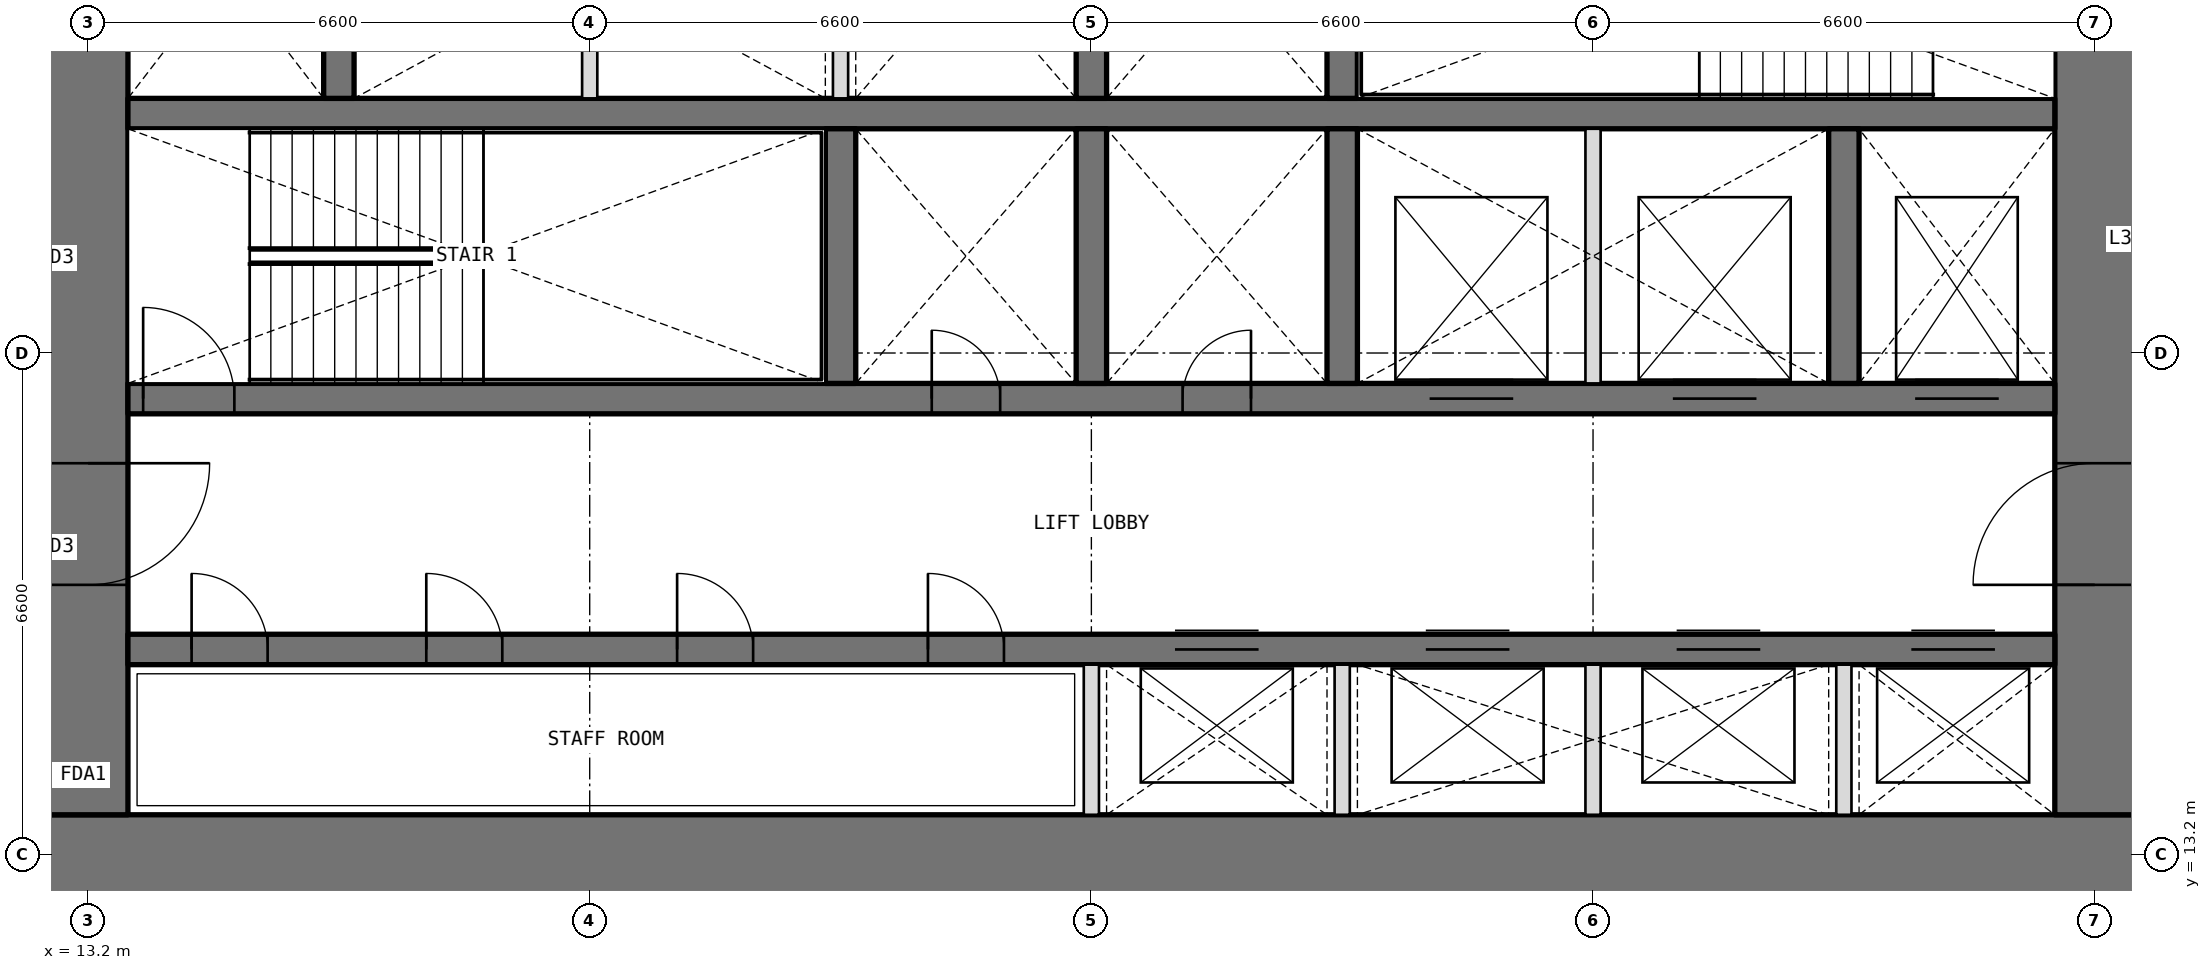
"""IFC4 building model, lengths in metres.
Left out: names, types, materials, properties, quantities, classifications, styles, units other than length and angle.
Written with IfcOpenShell. Run it as: python <this file> out.ifc"""

import sys

from ifc_helpers import new_model, si_unit, direction, frame, frame_2d, origin, place, context, subcontext, project, spatial, rectangle, extrude, element, fill, save


model = new_model("IFC4")
c1 = context("Model", 3, precision=1e-05, world=origin(), true_north=direction((0.0, 1.0)))
c2 = subcontext(c1, "Body", "Model", "MODEL_VIEW")
j1 = project(units=[si_unit("LENGTHUNIT", "METRE"), si_unit("PLANEANGLEUNIT", "RADIAN")], contexts=[c1])
p1 = place(None, origin())
s1 = spatial("IfcSite", under=j1, at=p1, CompositionType="ELEMENT")
p2 = place(p1, origin())
s2 = spatial("IfcBuilding", under=s1, at=p2, CompositionType="ELEMENT")
p3 = place(p2, frame((0.0, 0.0, 132.6)))
s3 = spatial("IfcBuildingStorey", under=s2, at=p3, CompositionType="ELEMENT", Elevation=132.6)
p4 = place(p3, frame((12.675, 13.2, 0.0), z_axis=(0.0, 0.0, 1.0), x_axis=(1.0, 0.0, 0.0)))
e1 = element("IfcWall", 1, at=p4, inside=s3, PredefinedType="SHEAR", context=c2, shape_type="SweptSolid", body=[
    extrude(rectangle(XDim=27.45, YDim=1.05, at=frame_2d((13.725, 0.0))), origin(), (0.0, 0.0, 1.0), 4.2),
])
p5 = place(p3, frame((39.6, 13.725, 0.0), z_axis=(0.0, 0.0, 1.0), x_axis=(0.0, 1.0, 0.0)))
e2 = element("IfcWall", 2, at=p5, inside=s3, PredefinedType="SHEAR", context=c2, shape_type="SweptSolid", body=[
    extrude(rectangle(XDim=18.75, YDim=1.05, at=frame_2d((9.375, 0.0))), origin(), (0.0, 0.0, 1.0), 4.2),
])
p6 = place(p5, frame((3.025, 0.0, 0.0)))
e3 = element("IfcOpeningElement", 3, at=p6, cuts=e2, PredefinedType="OPENING", context=c2, shape_type="SweptSolid", body=[
    extrude(rectangle(XDim=1.6, YDim=2.1, at=frame_2d((0.8, 1.05))), frame((0.0, 0.535, 0.0), z_axis=(0.0, -1.0, 0.0), x_axis=(1.0, 0.0, 0.0)), (0.0, 0.0, 1.0), 1.07),
])
p7 = place(p5, frame((13.825, 0.0, 0.0)))
e4 = element("IfcOpeningElement", 4, at=p7, cuts=e2, PredefinedType="OPENING", context=c2, shape_type="SweptSolid", body=[
    extrude(rectangle(XDim=1.6, YDim=2.1, at=frame_2d((0.8, 1.05))), frame((0.0, 0.535, 0.0), z_axis=(0.0, -1.0, 0.0), x_axis=(1.0, 0.0, 0.0)), (0.0, 0.0, 1.0), 1.07),
])
p8 = place(p3, frame((13.2, 32.475, 0.0), z_axis=(0.0, 0.0, 1.0), x_axis=(0.0, -1.0, 0.0)))
e5 = element("IfcWall", 5, at=p8, inside=s3, PredefinedType="SHEAR", context=c2, shape_type="SweptSolid", body=[
    extrude(rectangle(XDim=18.75, YDim=1.05, at=frame_2d((9.375, 0.0))), origin(), (0.0, 0.0, 1.0), 4.2),
])
p9 = place(p8, frame((14.125, 0.0, 0.0)))
e6 = element("IfcOpeningElement", 6, at=p9, cuts=e5, PredefinedType="OPENING", context=c2, shape_type="SweptSolid", body=[
    extrude(rectangle(XDim=1.6, YDim=2.1, at=frame_2d((0.8, 1.05))), frame((0.0, 0.535, 0.0), z_axis=(0.0, -1.0, 0.0), x_axis=(1.0, 0.0, 0.0)), (0.0, 0.0, 1.0), 1.07),
])
p10 = place(p8, frame((3.325, 0.0, 0.0)))
e7 = element("IfcOpeningElement", 7, at=p10, cuts=e5, PredefinedType="OPENING", context=c2, shape_type="SweptSolid", body=[
    extrude(rectangle(XDim=1.6, YDim=2.1, at=frame_2d((0.8, 1.05))), frame((0.0, 0.535, 0.0), z_axis=(0.0, -1.0, 0.0), x_axis=(1.0, 0.0, 0.0)), (0.0, 0.0, 1.0), 1.07),
])
p11 = place(p3, frame((13.725, 15.9, 0.0), z_axis=(0.0, 0.0, 1.0), x_axis=(1.0, 0.0, 0.0)))
e8 = element("IfcWall", 8, at=p11, inside=s3, PredefinedType="SHEAR", context=c2, shape_type="SweptSolid", body=[
    extrude(rectangle(XDim=25.35, YDim=0.4, at=frame_2d((12.675, 0.0))), origin(), (0.0, 0.0, 1.0), 4.2),
])
p12 = place(p11, frame((0.837, 0.0, 0.0)))
e9 = element("IfcOpeningElement", 9, at=p12, cuts=e8, PredefinedType="OPENING", context=c2, shape_type="SweptSolid", body=[
    extrude(rectangle(XDim=1.0, YDim=2.1, at=frame_2d((0.5, 1.05))), frame((0.0, 0.21, 0.0), z_axis=(0.0, -1.0, 0.0), x_axis=(1.0, 0.0, 0.0)), (0.0, 0.0, 1.0), 0.42),
])
p13 = place(p11, frame((3.925, 0.0, 0.0)))
e10 = element("IfcOpeningElement", 10, at=p13, cuts=e8, PredefinedType="OPENING", context=c2, shape_type="SweptSolid", body=[
    extrude(rectangle(XDim=1.0, YDim=2.1, at=frame_2d((0.5, 1.05))), frame((0.0, 0.21, 0.0), z_axis=(0.0, -1.0, 0.0), x_axis=(1.0, 0.0, 0.0)), (0.0, 0.0, 1.0), 0.42),
])
p14 = place(p11, frame((7.225, 0.0, 0.0)))
e11 = element("IfcOpeningElement", 11, at=p14, cuts=e8, PredefinedType="OPENING", context=c2, shape_type="SweptSolid", body=[
    extrude(rectangle(XDim=1.0, YDim=2.1, at=frame_2d((0.5, 1.05))), frame((0.0, 0.21, 0.0), z_axis=(0.0, -1.0, 0.0), x_axis=(1.0, 0.0, 0.0)), (0.0, 0.0, 1.0), 0.42),
])
p15 = place(p11, frame((10.525, 0.0, 0.0)))
e12 = element("IfcOpeningElement", 12, at=p15, cuts=e8, PredefinedType="OPENING", context=c2, shape_type="SweptSolid", body=[
    extrude(rectangle(XDim=1.0, YDim=2.1, at=frame_2d((0.5, 1.05))), frame((0.0, 0.21, 0.0), z_axis=(0.0, -1.0, 0.0), x_axis=(1.0, 0.0, 0.0)), (0.0, 0.0, 1.0), 0.42),
])
p16 = place(p11, frame((13.775, 0.0, 0.0)))
e13 = element("IfcOpeningElement", 13, at=p16, cuts=e8, PredefinedType="OPENING", context=c2, shape_type="SweptSolid", body=[
    extrude(rectangle(XDim=1.1, YDim=2.1, at=frame_2d((0.55, 1.05))), frame((0.0, 0.21, 0.0), z_axis=(0.0, -1.0, 0.0), x_axis=(1.0, 0.0, 0.0)), (0.0, 0.0, 1.0), 0.42),
])
p17 = place(p11, frame((17.075, 0.0, 0.0)))
e14 = element("IfcOpeningElement", 14, at=p17, cuts=e8, PredefinedType="OPENING", context=c2, shape_type="SweptSolid", body=[
    extrude(rectangle(XDim=1.1, YDim=2.1, at=frame_2d((0.55, 1.05))), frame((0.0, 0.21, 0.0), z_axis=(0.0, -1.0, 0.0), x_axis=(1.0, 0.0, 0.0)), (0.0, 0.0, 1.0), 0.42),
])
p18 = place(p11, frame((20.375, 0.0, 0.0)))
e15 = element("IfcOpeningElement", 15, at=p18, cuts=e8, PredefinedType="OPENING", context=c2, shape_type="SweptSolid", body=[
    extrude(rectangle(XDim=1.1, YDim=2.1, at=frame_2d((0.55, 1.05))), frame((0.0, 0.21, 0.0), z_axis=(0.0, -1.0, 0.0), x_axis=(1.0, 0.0, 0.0)), (0.0, 0.0, 1.0), 0.42),
])
p19 = place(p11, frame((23.462, 0.0, 0.0)))
e16 = element("IfcOpeningElement", 16, at=p19, cuts=e8, PredefinedType="OPENING", context=c2, shape_type="SweptSolid", body=[
    extrude(rectangle(XDim=1.1, YDim=2.1, at=frame_2d((0.55, 1.05))), frame((0.0, 0.21, 0.0), z_axis=(0.0, -1.0, 0.0), x_axis=(1.0, 0.0, 0.0)), (0.0, 0.0, 1.0), 0.42),
])
p20 = place(p3, frame((13.725, 19.2, 0.0), z_axis=(0.0, 0.0, 1.0), x_axis=(1.0, 0.0, 0.0)))
e17 = element("IfcWall", 17, at=p20, inside=s3, PredefinedType="SHEAR", context=c2, shape_type="SweptSolid", body=[
    extrude(rectangle(XDim=25.35, YDim=0.4, at=frame_2d((12.675, 0.0))), origin(), (0.0, 0.0, 1.0), 4.2),
])
p21 = place(p20, frame((10.575, 0.0, 0.0)))
e18 = element("IfcOpeningElement", 18, at=p21, cuts=e17, PredefinedType="OPENING", context=c2, shape_type="SweptSolid", body=[
    extrude(rectangle(XDim=0.9, YDim=2.1, at=frame_2d((0.45, 1.05))), frame((0.0, 0.21, 0.0), z_axis=(0.0, -1.0, 0.0), x_axis=(1.0, 0.0, 0.0)), (0.0, 0.0, 1.0), 0.42),
])
p22 = place(p20, frame((13.875, 0.0, 0.0)))
e19 = element("IfcOpeningElement", 19, at=p22, cuts=e17, PredefinedType="OPENING", context=c2, shape_type="SweptSolid", body=[
    extrude(rectangle(XDim=0.9, YDim=2.1, at=frame_2d((0.45, 1.05))), frame((0.0, 0.21, 0.0), z_axis=(0.0, -1.0, 0.0), x_axis=(1.0, 0.0, 0.0)), (0.0, 0.0, 1.0), 0.42),
])
p23 = place(p20, frame((0.2, 0.0, 0.0)))
e20 = element("IfcOpeningElement", 20, at=p23, cuts=e17, PredefinedType="OPENING", context=c2, shape_type="SweptSolid", body=[
    extrude(rectangle(XDim=1.2, YDim=2.1, at=frame_2d((0.6, 1.05))), frame((0.0, 0.21, 0.0), z_axis=(0.0, -1.0, 0.0), x_axis=(1.0, 0.0, 0.0)), (0.0, 0.0, 1.0), 0.42),
])
p24 = place(p20, frame((23.512, 0.0, 0.0)))
e21 = element("IfcOpeningElement", 21, at=p24, cuts=e17, PredefinedType="OPENING", context=c2, shape_type="SweptSolid", body=[
    extrude(rectangle(XDim=1.1, YDim=2.1, at=frame_2d((0.55, 1.05))), frame((0.0, 0.21, 0.0), z_axis=(0.0, -1.0, 0.0), x_axis=(1.0, 0.0, 0.0)), (0.0, 0.0, 1.0), 0.42),
])
p25 = place(p20, frame((17.125, 0.0, 0.0)))
e22 = element("IfcOpeningElement", 22, at=p25, cuts=e17, PredefinedType="OPENING", context=c2, shape_type="SweptSolid", body=[
    extrude(rectangle(XDim=1.1, YDim=2.1, at=frame_2d((0.55, 1.05))), frame((0.0, 0.21, 0.0), z_axis=(0.0, -1.0, 0.0), x_axis=(1.0, 0.0, 0.0)), (0.0, 0.0, 1.0), 0.42),
])
p26 = place(p20, frame((20.325, 0.0, 0.0)))
e23 = element("IfcOpeningElement", 23, at=p26, cuts=e17, PredefinedType="OPENING", context=c2, shape_type="SweptSolid", body=[
    extrude(rectangle(XDim=1.1, YDim=2.1, at=frame_2d((0.55, 1.05))), frame((0.0, 0.21, 0.0), z_axis=(0.0, -1.0, 0.0), x_axis=(1.0, 0.0, 0.0)), (0.0, 0.0, 1.0), 0.42),
])
p27 = place(p3, frame((13.725, 22.95, 0.0), z_axis=(0.0, 0.0, 1.0), x_axis=(1.0, 0.0, 0.0)))
e24 = element("IfcWall", 24, at=p27, inside=s3, PredefinedType="SHEAR", context=c2, shape_type="SweptSolid", body=[
    extrude(rectangle(XDim=25.35, YDim=0.4, at=frame_2d((12.675, 0.0))), origin(), (0.0, 0.0, 1.0), 4.2),
])
for number, where, z_axis, x_axis in (
    (25, (23.1, 19.4, 0.0), (0.0, 0.0, 1.0), (0.0, 1.0, 0.0)),
    (26, (26.4, 19.4, 0.0), (0.0, 0.0, 1.0), (0.0, 1.0, 0.0)),
    (27, (29.7, 19.4, 0.0), (0.0, 0.0, 1.0), (0.0, 1.0, 0.0)),
    (28, (36.3, 19.4, 0.0), (0.0, 0.0, 1.0), (0.0, 1.0, 0.0)),
    (29, (16.5, 23.15, 0.0), (0.0, 0.0, 1.0), (0.0, 1.0, 0.0)),
    (30, (26.4, 23.15, 0.0), (0.0, 0.0, 1.0), (0.0, 1.0, 0.0)),
    (31, (29.7, 23.15, 0.0), (0.0, 0.0, 1.0), (0.0, 1.0, 0.0)),
):
    element("IfcWall", number, at=place(p3, frame(where, z_axis=z_axis, x_axis=x_axis)), inside=s3, PredefinedType="SHEAR", context=c2, shape_type="SweptSolid", body=[
        extrude(rectangle(XDim=3.35, YDim=0.4, at=frame_2d((1.675, 0.0))), origin(), (0.0, 0.0, 1.0), 4.2),
    ])
for number, where, z_axis, x_axis in (
    (32, (26.4, 13.725, 0.0), (0.0, 0.0, 1.0), (0.0, 1.0, 0.0)),
    (33, (29.7, 13.725, 0.0), (0.0, 0.0, 1.0), (0.0, 1.0, 0.0)),
    (34, (33.0, 13.725, 0.0), (0.0, 0.0, 1.0), (0.0, 1.0, 0.0)),
    (35, (36.3, 13.725, 0.0), (0.0, 0.0, 1.0), (0.0, 1.0, 0.0)),
):
    element("IfcWall", number, at=place(p3, frame(where, z_axis=z_axis, x_axis=x_axis)), inside=s3, PredefinedType="PARTITIONING", context=c2, shape_type="SweptSolid", body=[
        extrude(rectangle(XDim=1.975, YDim=0.2, at=frame_2d((0.987, 0.0))), origin(), (0.0, 0.0, 1.0), 4.2),
    ])
for number, where, z_axis, x_axis in (
    (36, (33.0, 19.4, 0.0), (0.0, 0.0, 1.0), (0.0, 1.0, 0.0)),
    (37, (19.8, 23.15, 0.0), (0.0, 0.0, 1.0), (0.0, 1.0, 0.0)),
    (38, (23.1, 23.15, 0.0), (0.0, 0.0, 1.0), (0.0, 1.0, 0.0)),
):
    element("IfcWall", number, at=place(p3, frame(where, z_axis=z_axis, x_axis=x_axis)), inside=s3, PredefinedType="PARTITIONING", context=c2, shape_type="SweptSolid", body=[
        extrude(rectangle(XDim=3.35, YDim=0.2, at=frame_2d((1.675, 0.0))), origin(), (0.0, 0.0, 1.0), 4.2),
    ])
p28 = place(p21, origin())
e39 = element("IfcDoor", 39, at=p28, inside=s3, OperationType="SINGLE_SWING_LEFT", PredefinedType="DOOR", context=c2, shape_type="SweptSolid", body=[
    extrude(rectangle(XDim=0.9, YDim=2.1, at=frame_2d((0.45, 1.05))), frame((0.0, 0.025, 0.0), z_axis=(0.0, -1.0, 0.0), x_axis=(1.0, 0.0, 0.0)), (0.0, 0.0, 1.0), 0.05),
])
fill(e18, e39)
p29 = place(p22, origin())
e40 = element("IfcDoor", 40, at=p29, inside=s3, OperationType="SINGLE_SWING_RIGHT", PredefinedType="DOOR", context=c2, shape_type="SweptSolid", body=[
    extrude(rectangle(XDim=0.9, YDim=2.1, at=frame_2d((0.45, 1.05))), frame((0.0, 0.025, 0.0), z_axis=(0.0, -1.0, 0.0), x_axis=(1.0, 0.0, 0.0)), (0.0, 0.0, 1.0), 0.05),
])
fill(e19, e40)
p30 = place(p12, origin())
e41 = element("IfcDoor", 41, at=p30, inside=s3, OperationType="SINGLE_SWING_LEFT", PredefinedType="DOOR", context=c2, shape_type="SweptSolid", body=[
    extrude(rectangle(XDim=1.0, YDim=2.1, at=frame_2d((0.5, 1.05))), frame((0.0, 0.025, 0.0), z_axis=(0.0, -1.0, 0.0), x_axis=(1.0, 0.0, 0.0)), (0.0, 0.0, 1.0), 0.05),
])
fill(e9, e41)
p31 = place(p13, origin())
e42 = element("IfcDoor", 42, at=p31, inside=s3, OperationType="SINGLE_SWING_LEFT", PredefinedType="DOOR", context=c2, shape_type="SweptSolid", body=[
    extrude(rectangle(XDim=1.0, YDim=2.1, at=frame_2d((0.5, 1.05))), frame((0.0, 0.025, 0.0), z_axis=(0.0, -1.0, 0.0), x_axis=(1.0, 0.0, 0.0)), (0.0, 0.0, 1.0), 0.05),
])
fill(e10, e42)
p32 = place(p14, origin())
e43 = element("IfcDoor", 43, at=p32, inside=s3, OperationType="SINGLE_SWING_LEFT", PredefinedType="DOOR", context=c2, shape_type="SweptSolid", body=[
    extrude(rectangle(XDim=1.0, YDim=2.1, at=frame_2d((0.5, 1.05))), frame((0.0, 0.025, 0.0), z_axis=(0.0, -1.0, 0.0), x_axis=(1.0, 0.0, 0.0)), (0.0, 0.0, 1.0), 0.05),
])
fill(e11, e43)
p33 = place(p15, origin())
e44 = element("IfcDoor", 44, at=p33, inside=s3, OperationType="SINGLE_SWING_LEFT", PredefinedType="DOOR", context=c2, shape_type="SweptSolid", body=[
    extrude(rectangle(XDim=1.0, YDim=2.1, at=frame_2d((0.5, 1.05))), frame((0.0, 0.025, 0.0), z_axis=(0.0, -1.0, 0.0), x_axis=(1.0, 0.0, 0.0)), (0.0, 0.0, 1.0), 0.05),
])
fill(e12, e44)
p34 = place(p23, origin())
e45 = element("IfcDoor", 45, at=p34, inside=s3, OperationType="SINGLE_SWING_LEFT", PredefinedType="DOOR", context=c2, shape_type="SweptSolid", body=[
    extrude(rectangle(XDim=1.2, YDim=2.1, at=frame_2d((0.6, 1.05))), frame((0.0, 0.025, 0.0), z_axis=(0.0, -1.0, 0.0), x_axis=(1.0, 0.0, 0.0)), (0.0, 0.0, 1.0), 0.05),
])
fill(e20, e45)
p35 = place(p9, origin())
e46 = element("IfcDoor", 46, at=p35, inside=s3, OperationType="DOUBLE_DOOR_DOUBLE_SWING", PredefinedType="DOOR", context=c2, shape_type="SweptSolid", body=[
    extrude(rectangle(XDim=1.6, YDim=2.1, at=frame_2d((0.8, 1.05))), frame((0.0, 0.025, 0.0), z_axis=(0.0, -1.0, 0.0), x_axis=(1.0, 0.0, 0.0)), (0.0, 0.0, 1.0), 0.05),
])
fill(e6, e46)
p36 = place(p6, origin())
e47 = element("IfcDoor", 47, at=p36, inside=s3, OperationType="DOUBLE_DOOR_DOUBLE_SWING", PredefinedType="DOOR", context=c2, shape_type="SweptSolid", body=[
    extrude(rectangle(XDim=1.6, YDim=2.1, at=frame_2d((0.8, 1.05))), frame((0.0, 0.025, 0.0), z_axis=(0.0, -1.0, 0.0), x_axis=(1.0, 0.0, 0.0)), (0.0, 0.0, 1.0), 0.05),
])
fill(e3, e47)
p37 = place(p16, origin())
e48 = element("IfcDoor", 48, at=p37, inside=s3, OperationType="DOUBLE_DOOR_SLIDING", PredefinedType="DOOR", context=c2, shape_type="SweptSolid", body=[
    extrude(rectangle(XDim=1.1, YDim=2.1, at=frame_2d((0.55, 1.05))), frame((0.0, 0.025, 0.0), z_axis=(0.0, -1.0, 0.0), x_axis=(1.0, 0.0, 0.0)), (0.0, 0.0, 1.0), 0.05),
])
fill(e13, e48)
p38 = place(p17, origin())
e49 = element("IfcDoor", 49, at=p38, inside=s3, OperationType="DOUBLE_DOOR_SLIDING", PredefinedType="DOOR", context=c2, shape_type="SweptSolid", body=[
    extrude(rectangle(XDim=1.1, YDim=2.1, at=frame_2d((0.55, 1.05))), frame((0.0, 0.025, 0.0), z_axis=(0.0, -1.0, 0.0), x_axis=(1.0, 0.0, 0.0)), (0.0, 0.0, 1.0), 0.05),
])
fill(e14, e49)
p39 = place(p18, origin())
e50 = element("IfcDoor", 50, at=p39, inside=s3, OperationType="DOUBLE_DOOR_SLIDING", PredefinedType="DOOR", context=c2, shape_type="SweptSolid", body=[
    extrude(rectangle(XDim=1.1, YDim=2.1, at=frame_2d((0.55, 1.05))), frame((0.0, 0.025, 0.0), z_axis=(0.0, -1.0, 0.0), x_axis=(1.0, 0.0, 0.0)), (0.0, 0.0, 1.0), 0.05),
])
fill(e15, e50)
p40 = place(p19, origin())
e51 = element("IfcDoor", 51, at=p40, inside=s3, OperationType="DOUBLE_DOOR_SLIDING", PredefinedType="DOOR", context=c2, shape_type="SweptSolid", body=[
    extrude(rectangle(XDim=1.1, YDim=2.1, at=frame_2d((0.55, 1.05))), frame((0.0, 0.025, 0.0), z_axis=(0.0, -1.0, 0.0), x_axis=(1.0, 0.0, 0.0)), (0.0, 0.0, 1.0), 0.05),
])
fill(e16, e51)
p41 = place(p24, origin())
e52 = element("IfcDoor", 52, at=p41, inside=s3, OperationType="DOUBLE_DOOR_SLIDING", PredefinedType="DOOR", context=c2, shape_type="SweptSolid", body=[
    extrude(rectangle(XDim=1.1, YDim=2.1, at=frame_2d((0.55, 1.05))), frame((0.0, 0.025, 0.0), z_axis=(0.0, -1.0, 0.0), x_axis=(1.0, 0.0, 0.0)), (0.0, 0.0, 1.0), 0.05),
])
fill(e21, e52)
p42 = place(p25, origin())
e53 = element("IfcDoor", 53, at=p42, inside=s3, OperationType="DOUBLE_DOOR_SLIDING", PredefinedType="DOOR", context=c2, shape_type="SweptSolid", body=[
    extrude(rectangle(XDim=1.1, YDim=2.1, at=frame_2d((0.55, 1.05))), frame((0.0, 0.025, 0.0), z_axis=(0.0, -1.0, 0.0), x_axis=(1.0, 0.0, 0.0)), (0.0, 0.0, 1.0), 0.05),
])
fill(e22, e53)
p43 = place(p26, origin())
e54 = element("IfcDoor", 54, at=p43, inside=s3, OperationType="DOUBLE_DOOR_SLIDING", PredefinedType="DOOR", context=c2, shape_type="SweptSolid", body=[
    extrude(rectangle(XDim=1.1, YDim=2.1, at=frame_2d((0.55, 1.05))), frame((0.0, 0.025, 0.0), z_axis=(0.0, -1.0, 0.0), x_axis=(1.0, 0.0, 0.0)), (0.0, 0.0, 1.0), 0.05),
])
fill(e23, e54)
save(model, sys.argv[1])
